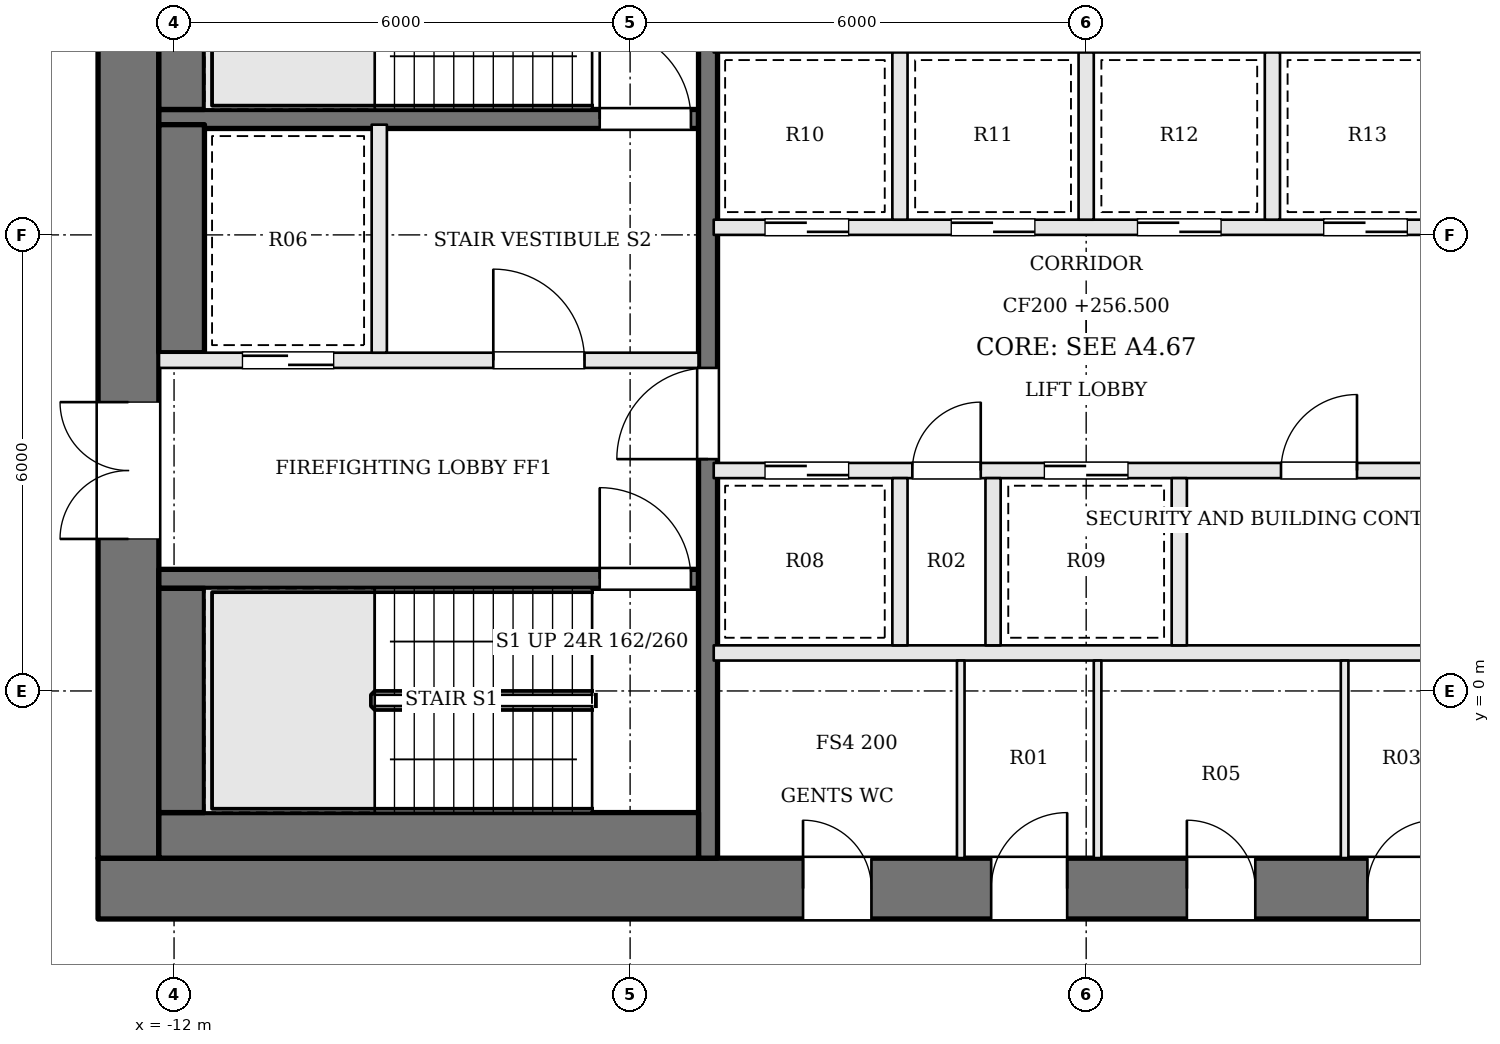
"""IFC4 building model, lengths in metres.
Left out: names, types, materials, properties, quantities, classifications, styles, units other than length and angle.
Written with IfcOpenShell. Run it as: python <this file> out.ifc"""

import sys

from ifc_helpers import new_model, si_unit, direction, frame, frame_2d, origin, place, context, subcontext, project, spatial, rectangle, extrude, element, fill, save


model = new_model("IFC4")
c1 = context("Model", 3, precision=1e-05, world=origin(), true_north=direction((0.0, 1.0)))
c2 = subcontext(c1, "Body", "Model", "MODEL_VIEW")
j1 = project(units=[si_unit("LENGTHUNIT", "METRE"), si_unit("PLANEANGLEUNIT", "RADIAN")], contexts=[c1])
p1 = place(None, origin())
s1 = spatial("IfcSite", under=j1, at=p1, CompositionType="ELEMENT")
p2 = place(p1, origin())
s2 = spatial("IfcBuilding", under=s1, at=p2, CompositionType="ELEMENT")
p3 = place(p2, frame((0.0, 0.0, 256.5)))
s3 = spatial("IfcBuildingStorey", under=s2, at=p3, CompositionType="ELEMENT", Elevation=256.5)
p4 = place(p3, frame((-13.0, -2.6, 0.0), z_axis=(0.0, 0.0, 1.0), x_axis=(1.0, 0.0, 0.0)))
e1 = element("IfcWall", 1, at=p4, inside=s3, PredefinedType="SHEAR", context=c2, shape_type="SweptSolid", body=[
    extrude(rectangle(XDim=26.0, YDim=0.8, at=frame_2d((13.0, 0.0))), origin(), (0.0, 0.0, 1.0), 3.9),
])
p5 = place(p4, frame((9.275, 0.0, 0.0)))
e2 = element("IfcOpeningElement", 2, at=p5, cuts=e1, PredefinedType="OPENING", context=c2, shape_type="SweptSolid", body=[
    extrude(rectangle(XDim=0.9, YDim=2.1, at=frame_2d((0.45, 1.05))), frame((0.0, 0.41, 0.0), z_axis=(0.0, -1.0, 0.0), x_axis=(1.0, 0.0, 0.0)), (0.0, 0.0, 1.0), 0.82),
])
p6 = place(p4, frame((11.75, 0.0, 0.0)))
e3 = element("IfcOpeningElement", 3, at=p6, cuts=e1, PredefinedType="OPENING", context=c2, shape_type="SweptSolid", body=[
    extrude(rectangle(XDim=1.0, YDim=2.1, at=frame_2d((0.5, 1.05))), frame((0.0, 0.41, 0.0), z_axis=(0.0, -1.0, 0.0), x_axis=(1.0, 0.0, 0.0)), (0.0, 0.0, 1.0), 0.82),
])
p7 = place(p4, frame((14.325, 0.0, 0.0)))
e4 = element("IfcOpeningElement", 4, at=p7, cuts=e1, PredefinedType="OPENING", context=c2, shape_type="SweptSolid", body=[
    extrude(rectangle(XDim=0.9, YDim=2.1, at=frame_2d((0.45, 1.05))), frame((0.0, 0.41, 0.0), z_axis=(0.0, -1.0, 0.0), x_axis=(1.0, 0.0, 0.0)), (0.0, 0.0, 1.0), 0.82),
])
p8 = place(p4, frame((16.7, 0.0, 0.0)))
e5 = element("IfcOpeningElement", 5, at=p8, cuts=e1, PredefinedType="OPENING", context=c2, shape_type="SweptSolid", body=[
    extrude(rectangle(XDim=0.9, YDim=2.1, at=frame_2d((0.45, 1.05))), frame((0.0, 0.41, 0.0), z_axis=(0.0, -1.0, 0.0), x_axis=(1.0, 0.0, 0.0)), (0.0, 0.0, 1.0), 0.82),
])
p9 = place(p3, frame((-12.6, -2.2, 0.0), z_axis=(0.0, 0.0, 1.0), x_axis=(0.0, 1.0, 0.0)))
e6 = element("IfcWall", 6, at=p9, inside=s3, PredefinedType="SHEAR", context=c2, shape_type="SweptSolid", body=[
    extrude(rectangle(XDim=13.4, YDim=0.8, at=frame_2d((6.7, 0.0))), origin(), (0.0, 0.0, 1.0), 3.9),
])
p10 = place(p9, frame((4.2, 0.0, 0.0)))
e7 = element("IfcOpeningElement", 7, at=p10, cuts=e6, PredefinedType="OPENING", context=c2, shape_type="SweptSolid", body=[
    extrude(rectangle(XDim=1.8, YDim=2.1, at=frame_2d((0.9, 1.05))), frame((0.0, 0.41, 0.0), z_axis=(0.0, -1.0, 0.0), x_axis=(1.0, 0.0, 0.0)), (0.0, 0.0, 1.0), 0.82),
])
p11 = place(p3, frame((-12.2, 1.475, 0.0), z_axis=(0.0, 0.0, 1.0), x_axis=(1.0, 0.0, 0.0)))
e8 = element("IfcWall", 8, at=p11, inside=s3, PredefinedType="SOLIDWALL", context=c2, shape_type="SweptSolid", body=[
    extrude(rectangle(XDim=7.1, YDim=0.25, at=frame_2d((3.55, 0.0))), origin(), (0.0, 0.0, 1.0), 3.7),
])
p12 = place(p11, frame((5.8, 0.0, 0.0)))
e9 = element("IfcOpeningElement", 9, at=p12, cuts=e8, PredefinedType="OPENING", context=c2, shape_type="SweptSolid", body=[
    extrude(rectangle(XDim=1.2, YDim=2.1, at=frame_2d((0.6, 1.05))), frame((0.0, 0.135, 0.0), z_axis=(0.0, -1.0, 0.0), x_axis=(1.0, 0.0, 0.0)), (0.0, 0.0, 1.0), 0.27),
])
p13 = place(p3, frame((-12.2, 4.35, 0.0), z_axis=(0.0, 0.0, 1.0), x_axis=(1.0, 0.0, 0.0)))
e10 = element("IfcWall", 10, at=p13, inside=s3, PredefinedType="SOLIDWALL", context=c2, shape_type="SweptSolid", body=[
    extrude(rectangle(XDim=7.1, YDim=0.2, at=frame_2d((3.55, 0.0))), origin(), (0.0, 0.0, 1.0), 3.7),
])
p14 = place(p13, frame((4.4, 0.0, 0.0)))
e11 = element("IfcOpeningElement", 11, at=p14, cuts=e10, PredefinedType="OPENING", context=c2, shape_type="SweptSolid", body=[
    extrude(rectangle(XDim=1.2, YDim=2.1, at=frame_2d((0.6, 1.05))), frame((0.0, 0.11, 0.0), z_axis=(0.0, -1.0, 0.0), x_axis=(1.0, 0.0, 0.0)), (0.0, 0.0, 1.0), 0.22),
])
p15 = place(p13, frame((1.1, 0.0, 0.0)))
e12 = element("IfcOpeningElement", 12, at=p15, cuts=e10, PredefinedType="OPENING", context=c2, shape_type="SweptSolid", body=[
    extrude(rectangle(XDim=1.2, YDim=2.1, at=frame_2d((0.6, 1.05))), frame((0.0, 0.11, 0.0), z_axis=(0.0, -1.0, 0.0), x_axis=(1.0, 0.0, 0.0)), (0.0, 0.0, 1.0), 0.22),
])
p16 = place(p3, frame((-12.2, 7.525, 0.0), z_axis=(0.0, 0.0, 1.0), x_axis=(1.0, 0.0, 0.0)))
e13 = element("IfcWall", 13, at=p16, inside=s3, PredefinedType="SOLIDWALL", context=c2, shape_type="SweptSolid", body=[
    extrude(rectangle(XDim=7.1, YDim=0.25, at=frame_2d((3.55, 0.0))), origin(), (0.0, 0.0, 1.0), 3.7),
])
p17 = place(p16, frame((5.8, 0.0, 0.0)))
e14 = element("IfcOpeningElement", 14, at=p17, cuts=e13, PredefinedType="OPENING", context=c2, shape_type="SweptSolid", body=[
    extrude(rectangle(XDim=1.2, YDim=2.1, at=frame_2d((0.6, 1.05))), frame((0.0, 0.135, 0.0), z_axis=(0.0, -1.0, 0.0), x_axis=(1.0, 0.0, 0.0)), (0.0, 0.0, 1.0), 0.27),
])
p18 = place(p3, frame((-9.3, 4.45, 0.0), z_axis=(0.0, 0.0, 1.0), x_axis=(0.0, 1.0, 0.0)))
e15 = element("IfcWall", 15, at=p18, inside=s3, PredefinedType="SOLIDWALL", context=c2, shape_type="SweptSolid", body=[
    extrude(rectangle(XDim=3.0, YDim=0.2, at=frame_2d((1.5, 0.0))), origin(), (0.0, 0.0, 1.0), 3.7),
])
p19 = place(p3, frame((-4.975, -2.2, 0.0), z_axis=(0.0, 0.0, 1.0), x_axis=(0.0, 1.0, 0.0)))
e16 = element("IfcWall", 16, at=p19, inside=s3, PredefinedType="SOLIDWALL", context=c2, shape_type="SweptSolid", body=[
    extrude(rectangle(XDim=13.4, YDim=0.25, at=frame_2d((6.7, 0.0))), origin(), (0.0, 0.0, 1.0), 3.7),
])
p20 = place(p19, frame((5.25, 0.0, 0.0)))
e17 = element("IfcOpeningElement", 17, at=p20, cuts=e16, PredefinedType="OPENING", context=c2, shape_type="SweptSolid", body=[
    extrude(rectangle(XDim=1.2, YDim=2.1, at=frame_2d((0.6, 1.05))), frame((0.0, 0.135, 0.0), z_axis=(0.0, -1.0, 0.0), x_axis=(1.0, 0.0, 0.0)), (0.0, 0.0, 1.0), 0.27),
])
p21 = place(p3, frame((-12.2, -1.9, 0.0), z_axis=(0.0, 0.0, 1.0), x_axis=(1.0, 0.0, 0.0)))
e18 = element("IfcWall", 18, at=p21, inside=s3, PredefinedType="SOLIDWALL", context=c2, shape_type="SweptSolid", body=[
    extrude(rectangle(XDim=7.1, YDim=0.6, at=frame_2d((3.55, 0.0))), origin(), (0.0, 0.0, 1.0), 3.7),
])
p22 = place(p3, frame((-11.9, -1.6, 0.0), z_axis=(0.0, 0.0, 1.0), x_axis=(0.0, 1.0, 0.0)))
e19 = element("IfcWall", 19, at=p22, inside=s3, PredefinedType="SOLIDWALL", context=c2, shape_type="SweptSolid", body=[
    extrude(rectangle(XDim=2.95, YDim=0.6, at=frame_2d((1.475, 0.0))), origin(), (0.0, 0.0, 1.0), 3.7),
])
p23 = place(p3, frame((-11.9, 4.45, 0.0), z_axis=(0.0, 0.0, 1.0), x_axis=(0.0, 1.0, 0.0)))
e20 = element("IfcWall", 20, at=p23, inside=s3, PredefinedType="SOLIDWALL", context=c2, shape_type="SweptSolid", body=[
    extrude(rectangle(XDim=3.0, YDim=0.6, at=frame_2d((1.5, 0.0))), origin(), (0.0, 0.0, 1.0), 3.7),
])
p24 = place(p3, frame((-11.9, 7.65, 0.0), z_axis=(0.0, 0.0, 1.0), x_axis=(0.0, 1.0, 0.0)))
e21 = element("IfcWall", 21, at=p24, inside=s3, PredefinedType="SOLIDWALL", context=c2, shape_type="SweptSolid", body=[
    extrude(rectangle(XDim=2.95, YDim=0.6, at=frame_2d((1.475, 0.0))), origin(), (0.0, 0.0, 1.0), 3.7),
])
p25 = place(p3, frame((-4.9, 0.5, 0.0), z_axis=(0.0, 0.0, 1.0), x_axis=(1.0, 0.0, 0.0)))
e22 = element("IfcWall", 22, at=p25, inside=s3, PredefinedType="SOLIDWALL", context=c2, shape_type="SweptSolid", body=[
    extrude(rectangle(XDim=9.8, YDim=0.2, at=frame_2d((4.9, 0.0))), origin(), (0.0, 0.0, 1.0), 3.7),
])
p26 = place(p3, frame((-4.9, 2.9, 0.0), z_axis=(0.0, 0.0, 1.0), x_axis=(1.0, 0.0, 0.0)))
e23 = element("IfcWall", 23, at=p26, inside=s3, PredefinedType="SOLIDWALL", context=c2, shape_type="SweptSolid", body=[
    extrude(rectangle(XDim=9.8, YDim=0.2, at=frame_2d((4.9, 0.0))), origin(), (0.0, 0.0, 1.0), 3.7),
])
p27 = place(p26, frame((0.675, 0.0, 0.0)))
e24 = element("IfcOpeningElement", 24, at=p27, cuts=e23, PredefinedType="OPENING", context=c2, shape_type="SweptSolid", body=[
    extrude(rectangle(XDim=1.1, YDim=2.1, at=frame_2d((0.55, 1.05))), frame((0.0, 0.11, 0.0), z_axis=(0.0, -1.0, 0.0), x_axis=(1.0, 0.0, 0.0)), (0.0, 0.0, 1.0), 0.22),
])
p28 = place(p26, frame((2.613, 0.0, 0.0)))
e25 = element("IfcOpeningElement", 25, at=p28, cuts=e23, PredefinedType="OPENING", context=c2, shape_type="SweptSolid", body=[
    extrude(rectangle(XDim=0.9, YDim=2.1, at=frame_2d((0.45, 1.05))), frame((0.0, 0.11, 0.0), z_axis=(0.0, -1.0, 0.0), x_axis=(1.0, 0.0, 0.0)), (0.0, 0.0, 1.0), 0.22),
])
p29 = place(p26, frame((4.35, 0.0, 0.0)))
e26 = element("IfcOpeningElement", 26, at=p29, cuts=e23, PredefinedType="OPENING", context=c2, shape_type="SweptSolid", body=[
    extrude(rectangle(XDim=1.1, YDim=2.1, at=frame_2d((0.55, 1.05))), frame((0.0, 0.11, 0.0), z_axis=(0.0, -1.0, 0.0), x_axis=(1.0, 0.0, 0.0)), (0.0, 0.0, 1.0), 0.22),
])
p30 = place(p26, frame((7.463, 0.0, 0.0)))
e27 = element("IfcOpeningElement", 27, at=p30, cuts=e23, PredefinedType="OPENING", context=c2, shape_type="SweptSolid", body=[
    extrude(rectangle(XDim=1.0, YDim=2.1, at=frame_2d((0.5, 1.05))), frame((0.0, 0.11, 0.0), z_axis=(0.0, -1.0, 0.0), x_axis=(1.0, 0.0, 0.0)), (0.0, 0.0, 1.0), 0.22),
])
p31 = place(p3, frame((-4.9, 6.1, 0.0), z_axis=(0.0, 0.0, 1.0), x_axis=(1.0, 0.0, 0.0)))
e28 = element("IfcWall", 28, at=p31, inside=s3, PredefinedType="SOLIDWALL", context=c2, shape_type="SweptSolid", body=[
    extrude(rectangle(XDim=9.8, YDim=0.2, at=frame_2d((4.9, 0.0))), origin(), (0.0, 0.0, 1.0), 3.7),
])
p32 = place(p31, frame((0.675, 0.0, 0.0)))
e29 = element("IfcOpeningElement", 29, at=p32, cuts=e28, PredefinedType="OPENING", context=c2, shape_type="SweptSolid", body=[
    extrude(rectangle(XDim=1.1, YDim=2.1, at=frame_2d((0.55, 1.05))), frame((0.0, 0.11, 0.0), z_axis=(0.0, -1.0, 0.0), x_axis=(1.0, 0.0, 0.0)), (0.0, 0.0, 1.0), 0.22),
])
p33 = place(p31, frame((3.125, 0.0, 0.0)))
e30 = element("IfcOpeningElement", 30, at=p33, cuts=e28, PredefinedType="OPENING", context=c2, shape_type="SweptSolid", body=[
    extrude(rectangle(XDim=1.1, YDim=2.1, at=frame_2d((0.55, 1.05))), frame((0.0, 0.11, 0.0), z_axis=(0.0, -1.0, 0.0), x_axis=(1.0, 0.0, 0.0)), (0.0, 0.0, 1.0), 0.22),
])
p34 = place(p31, frame((5.575, 0.0, 0.0)))
e31 = element("IfcOpeningElement", 31, at=p34, cuts=e28, PredefinedType="OPENING", context=c2, shape_type="SweptSolid", body=[
    extrude(rectangle(XDim=1.1, YDim=2.1, at=frame_2d((0.55, 1.05))), frame((0.0, 0.11, 0.0), z_axis=(0.0, -1.0, 0.0), x_axis=(1.0, 0.0, 0.0)), (0.0, 0.0, 1.0), 0.22),
])
p35 = place(p31, frame((8.025, 0.0, 0.0)))
e32 = element("IfcOpeningElement", 32, at=p35, cuts=e28, PredefinedType="OPENING", context=c2, shape_type="SweptSolid", body=[
    extrude(rectangle(XDim=1.1, YDim=2.1, at=frame_2d((0.55, 1.05))), frame((0.0, 0.11, 0.0), z_axis=(0.0, -1.0, 0.0), x_axis=(1.0, 0.0, 0.0)), (0.0, 0.0, 1.0), 0.22),
])
for number, where, z_axis, x_axis in (
    (33, (-2.45, 0.6, 0.0), (0.0, 0.0, 1.0), (0.0, 1.0, 0.0)),
    (34, (-1.225, 0.6, 0.0), (0.0, 0.0, 1.0), (0.0, 1.0, 0.0)),
    (35, (1.225, 0.6, 0.0), (0.0, 0.0, 1.0), (0.0, 1.0, 0.0)),
    (36, (-2.45, 6.2, 0.0), (0.0, 0.0, 1.0), (0.0, 1.0, 0.0)),
    (37, (0.0, 6.2, 0.0), (0.0, 0.0, 1.0), (0.0, 1.0, 0.0)),
    (38, (2.45, 6.2, 0.0), (0.0, 0.0, 1.0), (0.0, 1.0, 0.0)),
):
    element("IfcWall", number, at=place(p3, frame(where, z_axis=z_axis, x_axis=x_axis)), inside=s3, PredefinedType="SOLIDWALL", context=c2, shape_type="SweptSolid", body=[
        extrude(rectangle(XDim=2.2, YDim=0.2, at=frame_2d((1.1, 0.0))), origin(), (0.0, 0.0, 1.0), 3.7),
    ])
for number, where, z_axis, x_axis in (
    (39, (-1.65, -2.2, 0.0), (0.0, 0.0, 1.0), (0.0, 1.0, 0.0)),
    (40, (0.15, -2.2, 0.0), (0.0, 0.0, 1.0), (0.0, 1.0, 0.0)),
    (41, (3.4, -2.2, 0.0), (0.0, 0.0, 1.0), (0.0, 1.0, 0.0)),
):
    element("IfcWall", number, at=place(p3, frame(where, z_axis=z_axis, x_axis=x_axis)), inside=s3, PredefinedType="PARTITIONING", context=c2, shape_type="SweptSolid", body=[
        extrude(rectangle(XDim=2.6, YDim=0.1, at=frame_2d((1.3, 0.0))), origin(), (0.0, 0.0, 1.0), 3.7),
    ])
p36 = place(p10, origin())
e42 = element("IfcDoor", 42, at=p36, inside=s3, OperationType="DOUBLE_DOOR_SINGLE_SWING", PredefinedType="DOOR", context=c2, shape_type="SweptSolid", body=[
    extrude(rectangle(XDim=1.8, YDim=2.1, at=frame_2d((0.9, 1.05))), frame((0.0, 0.025, 0.0), z_axis=(0.0, -1.0, 0.0), x_axis=(1.0, 0.0, 0.0)), (0.0, 0.0, 1.0), 0.05),
])
fill(e7, e42)
p37 = place(p20, origin())
e43 = element("IfcDoor", 43, at=p37, inside=s3, OperationType="SINGLE_SWING_LEFT", PredefinedType="DOOR", context=c2, shape_type="SweptSolid", body=[
    extrude(rectangle(XDim=1.2, YDim=2.1, at=frame_2d((0.6, 1.05))), frame((0.0, 0.025, 0.0), z_axis=(0.0, -1.0, 0.0), x_axis=(1.0, 0.0, 0.0)), (0.0, 0.0, 1.0), 0.05),
])
fill(e17, e43)
p38 = place(p14, origin())
e44 = element("IfcDoor", 44, at=p38, inside=s3, OperationType="SINGLE_SWING_LEFT", PredefinedType="DOOR", context=c2, shape_type="SweptSolid", body=[
    extrude(rectangle(XDim=1.2, YDim=2.1, at=frame_2d((0.6, 1.05))), frame((0.0, 0.025, 0.0), z_axis=(0.0, -1.0, 0.0), x_axis=(1.0, 0.0, 0.0)), (0.0, 0.0, 1.0), 0.05),
])
fill(e11, e44)
p39 = place(p12, origin())
e45 = element("IfcDoor", 45, at=p39, inside=s3, OperationType="SINGLE_SWING_LEFT", PredefinedType="DOOR", context=c2, shape_type="SweptSolid", body=[
    extrude(rectangle(XDim=1.2, YDim=2.1, at=frame_2d((0.6, 1.05))), frame((0.0, 0.025, 0.0), z_axis=(0.0, -1.0, 0.0), x_axis=(1.0, 0.0, 0.0)), (0.0, 0.0, 1.0), 0.05),
])
fill(e9, e45)
p40 = place(p17, origin())
e46 = element("IfcDoor", 46, at=p40, inside=s3, OperationType="SINGLE_SWING_LEFT", PredefinedType="DOOR", context=c2, shape_type="SweptSolid", body=[
    extrude(rectangle(XDim=1.2, YDim=2.1, at=frame_2d((0.6, 1.05))), frame((0.0, 0.025, 0.0), z_axis=(0.0, -1.0, 0.0), x_axis=(1.0, 0.0, 0.0)), (0.0, 0.0, 1.0), 0.05),
])
fill(e14, e46)
p41 = place(p15, origin())
e47 = element("IfcDoor", 47, at=p41, inside=s3, OperationType="SLIDING_TO_RIGHT", PredefinedType="DOOR", context=c2, shape_type="SweptSolid", body=[
    extrude(rectangle(XDim=1.2, YDim=2.1, at=frame_2d((0.6, 1.05))), frame((0.0, 0.025, 0.0), z_axis=(0.0, -1.0, 0.0), x_axis=(1.0, 0.0, 0.0)), (0.0, 0.0, 1.0), 0.05),
])
fill(e12, e47)
p42 = place(p27, origin())
e48 = element("IfcDoor", 48, at=p42, inside=s3, OperationType="SLIDING_TO_RIGHT", PredefinedType="DOOR", context=c2, shape_type="SweptSolid", body=[
    extrude(rectangle(XDim=1.1, YDim=2.1, at=frame_2d((0.55, 1.05))), frame((0.0, 0.025, 0.0), z_axis=(0.0, -1.0, 0.0), x_axis=(1.0, 0.0, 0.0)), (0.0, 0.0, 1.0), 0.05),
])
fill(e24, e48)
p43 = place(p28, origin())
e49 = element("IfcDoor", 49, at=p43, inside=s3, OperationType="SINGLE_SWING_RIGHT", PredefinedType="DOOR", context=c2, shape_type="SweptSolid", body=[
    extrude(rectangle(XDim=0.9, YDim=2.1, at=frame_2d((0.45, 1.05))), frame((0.0, 0.025, 0.0), z_axis=(0.0, -1.0, 0.0), x_axis=(1.0, 0.0, 0.0)), (0.0, 0.0, 1.0), 0.05),
])
fill(e25, e49)
p44 = place(p29, origin())
e50 = element("IfcDoor", 50, at=p44, inside=s3, OperationType="SLIDING_TO_LEFT", PredefinedType="DOOR", context=c2, shape_type="SweptSolid", body=[
    extrude(rectangle(XDim=1.1, YDim=2.1, at=frame_2d((0.55, 1.05))), frame((0.0, 0.025, 0.0), z_axis=(0.0, -1.0, 0.0), x_axis=(1.0, 0.0, 0.0)), (0.0, 0.0, 1.0), 0.05),
])
fill(e26, e50)
p45 = place(p30, origin())
e51 = element("IfcDoor", 51, at=p45, inside=s3, OperationType="SINGLE_SWING_RIGHT", PredefinedType="DOOR", context=c2, shape_type="SweptSolid", body=[
    extrude(rectangle(XDim=1.0, YDim=2.1, at=frame_2d((0.5, 1.05))), frame((0.0, 0.025, 0.0), z_axis=(0.0, -1.0, 0.0), x_axis=(1.0, 0.0, 0.0)), (0.0, 0.0, 1.0), 0.05),
])
fill(e27, e51)
p46 = place(p32, origin())
e52 = element("IfcDoor", 52, at=p46, inside=s3, OperationType="SLIDING_TO_RIGHT", PredefinedType="DOOR", context=c2, shape_type="SweptSolid", body=[
    extrude(rectangle(XDim=1.1, YDim=2.1, at=frame_2d((0.55, 1.05))), frame((0.0, 0.025, 0.0), z_axis=(0.0, -1.0, 0.0), x_axis=(1.0, 0.0, 0.0)), (0.0, 0.0, 1.0), 0.05),
])
fill(e29, e52)
p47 = place(p33, origin())
e53 = element("IfcDoor", 53, at=p47, inside=s3, OperationType="SLIDING_TO_LEFT", PredefinedType="DOOR", context=c2, shape_type="SweptSolid", body=[
    extrude(rectangle(XDim=1.1, YDim=2.1, at=frame_2d((0.55, 1.05))), frame((0.0, 0.025, 0.0), z_axis=(0.0, -1.0, 0.0), x_axis=(1.0, 0.0, 0.0)), (0.0, 0.0, 1.0), 0.05),
])
fill(e30, e53)
p48 = place(p34, origin())
e54 = element("IfcDoor", 54, at=p48, inside=s3, OperationType="SLIDING_TO_RIGHT", PredefinedType="DOOR", context=c2, shape_type="SweptSolid", body=[
    extrude(rectangle(XDim=1.1, YDim=2.1, at=frame_2d((0.55, 1.05))), frame((0.0, 0.025, 0.0), z_axis=(0.0, -1.0, 0.0), x_axis=(1.0, 0.0, 0.0)), (0.0, 0.0, 1.0), 0.05),
])
fill(e31, e54)
p49 = place(p35, origin())
e55 = element("IfcDoor", 55, at=p49, inside=s3, OperationType="SLIDING_TO_LEFT", PredefinedType="DOOR", context=c2, shape_type="SweptSolid", body=[
    extrude(rectangle(XDim=1.1, YDim=2.1, at=frame_2d((0.55, 1.05))), frame((0.0, 0.025, 0.0), z_axis=(0.0, -1.0, 0.0), x_axis=(1.0, 0.0, 0.0)), (0.0, 0.0, 1.0), 0.05),
])
fill(e32, e55)
p50 = place(p5, origin())
e56 = element("IfcDoor", 56, at=p50, inside=s3, OperationType="SINGLE_SWING_LEFT", PredefinedType="DOOR", context=c2, shape_type="SweptSolid", body=[
    extrude(rectangle(XDim=0.9, YDim=2.1, at=frame_2d((0.45, 1.05))), frame((0.0, 0.025, 0.0), z_axis=(0.0, -1.0, 0.0), x_axis=(1.0, 0.0, 0.0)), (0.0, 0.0, 1.0), 0.05),
])
fill(e2, e56)
p51 = place(p6, origin())
e57 = element("IfcDoor", 57, at=p51, inside=s3, OperationType="SINGLE_SWING_RIGHT", PredefinedType="DOOR", context=c2, shape_type="SweptSolid", body=[
    extrude(rectangle(XDim=1.0, YDim=2.1, at=frame_2d((0.5, 1.05))), frame((0.0, 0.025, 0.0), z_axis=(0.0, -1.0, 0.0), x_axis=(1.0, 0.0, 0.0)), (0.0, 0.0, 1.0), 0.05),
])
fill(e3, e57)
p52 = place(p7, origin())
e58 = element("IfcDoor", 58, at=p52, inside=s3, OperationType="SINGLE_SWING_LEFT", PredefinedType="DOOR", context=c2, shape_type="SweptSolid", body=[
    extrude(rectangle(XDim=0.9, YDim=2.1, at=frame_2d((0.45, 1.05))), frame((0.0, 0.025, 0.0), z_axis=(0.0, -1.0, 0.0), x_axis=(1.0, 0.0, 0.0)), (0.0, 0.0, 1.0), 0.05),
])
fill(e4, e58)
p53 = place(p8, origin())
e59 = element("IfcDoor", 59, at=p53, inside=s3, OperationType="SINGLE_SWING_RIGHT", PredefinedType="DOOR", context=c2, shape_type="SweptSolid", body=[
    extrude(rectangle(XDim=0.9, YDim=2.1, at=frame_2d((0.45, 1.05))), frame((0.0, 0.025, 0.0), z_axis=(0.0, -1.0, 0.0), x_axis=(1.0, 0.0, 0.0)), (0.0, 0.0, 1.0), 0.05),
])
fill(e5, e59)
save(model, sys.argv[1])
